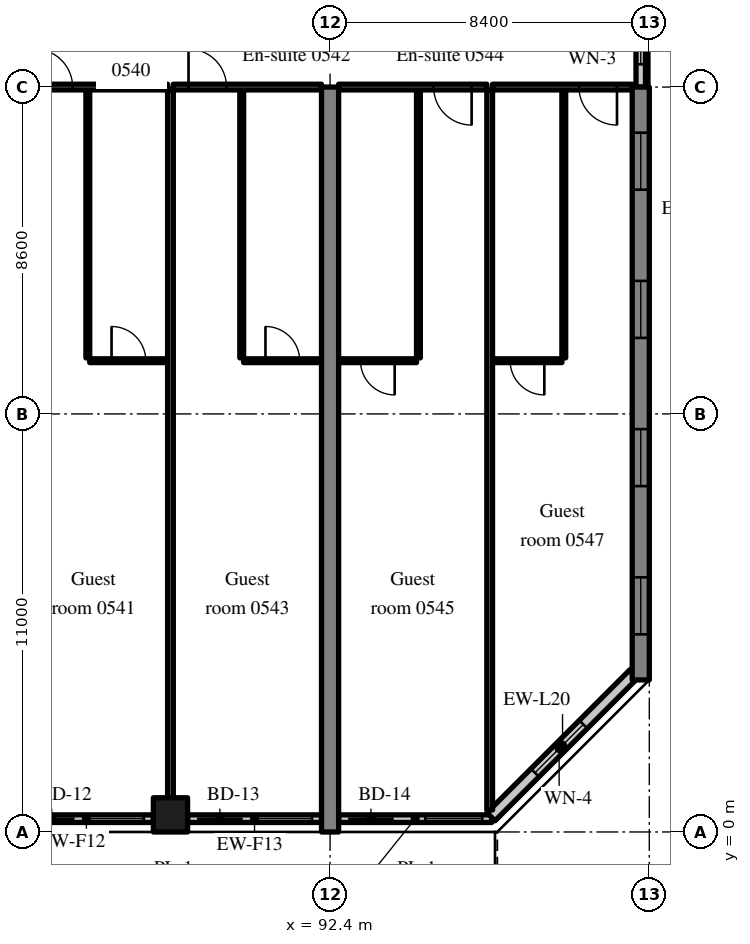
"""IFC4 building model, lengths in metres.
Left out: names, types, materials, properties, quantities, classifications, styles, units other than length and angle.
Written with IfcOpenShell. Run it as: python <this file> out.ifc"""

import sys

from ifc_helpers import new_model, si_unit, direction, frame, frame_2d, origin, origin_2d, place, context, subcontext, project, spatial, rectangle, extrude, source, transform, mapped, element, fill, save


model = new_model("IFC4")
c1 = context("Model", 3, precision=1e-05, world=origin(), true_north=direction((0.0, 1.0)))
c2 = subcontext(c1, "Body", "Model", "MODEL_VIEW")
j1 = project(units=[si_unit("LENGTHUNIT", "METRE"), si_unit("PLANEANGLEUNIT", "RADIAN")], contexts=[c1])
p1 = place(None, origin())
s1 = spatial("IfcSite", under=j1, at=p1, CompositionType="ELEMENT")
p2 = place(p1, origin())
s2 = spatial("IfcBuilding", under=s1, at=p2, CompositionType="ELEMENT")
p3 = place(p2, frame((0.0, 0.0, 27.8)))
s3 = spatial("IfcBuildingStorey", under=s2, at=p3, CompositionType="ELEMENT", Elevation=27.8)
m1 = source(origin(), c2, "Body", "SweptSolid", [
    extrude(rectangle(XDim=19.6, YDim=0.45, at=frame_2d((9.8, 0.0))), origin(), (0.0, 0.0, 1.0), 3.52),
])
p4 = place(p3, frame((92.4, 0.0, 0.0), z_axis=(0.0, 0.0, 1.0), x_axis=(0.0, 1.0, 0.0)))
e1 = element("IfcWall", 1, at=p4, inside=s3, PredefinedType="SHEAR", context=c2, shape_type="MappedRepresentation", body=[
    mapped(m1, transform((0.0, 0.0, 0.0), scale=1.0)),
])
m2 = source(origin(), c2, "Body", "SweptSolid", [
    extrude(rectangle(XDim=15.6, YDim=0.45, at=frame_2d((7.8, 0.0))), origin(), (0.0, 0.0, 1.0), 3.52),
])
p5 = place(p3, frame((100.575, 4.0, 0.0), z_axis=(0.0, 0.0, 1.0), x_axis=(0.0, 1.0, 0.0)))
e2 = element("IfcWall", 2, at=p5, inside=s3, PredefinedType="SHEAR", context=c2, shape_type="MappedRepresentation", body=[
    mapped(m2, transform((0.0, 0.0, 0.0), scale=1.0)),
])
m3 = source(origin(), c2, "Body", "SweptSolid", [
    extrude(rectangle(XDim=1.5, YDim=1.5, at=frame_2d((0.75, 0.75))), frame((0.0, 0.235, 0.0), z_axis=(0.0, -1.0, 0.0), x_axis=(1.0, 0.0, 0.0)), (0.0, 0.0, 1.0), 0.47),
])
p6 = place(p5, frame((1.2, 0.0, 0.9)))
e3 = element("IfcOpeningElement", 3, at=p6, cuts=e2, PredefinedType="OPENING", context=c2, shape_type="MappedRepresentation", body=[
    mapped(m3, transform((0.0, 0.0, 0.0), scale=1.0)),
])
p7 = place(p5, frame((5.1, 0.0, 0.9)))
e4 = element("IfcOpeningElement", 4, at=p7, cuts=e2, PredefinedType="OPENING", context=c2, shape_type="MappedRepresentation", body=[
    mapped(m3, transform((0.0, 0.0, 0.0), scale=1.0)),
])
p8 = place(p5, frame((9.0, 0.0, 0.9)))
e5 = element("IfcOpeningElement", 5, at=p8, cuts=e2, PredefinedType="OPENING", context=c2, shape_type="MappedRepresentation", body=[
    mapped(m3, transform((0.0, 0.0, 0.0), scale=1.0)),
])
p9 = place(p5, frame((12.9, 0.0, 0.9)))
e6 = element("IfcOpeningElement", 6, at=p9, cuts=e2, PredefinedType="OPENING", context=c2, shape_type="MappedRepresentation", body=[
    mapped(m3, transform((0.0, 0.0, 0.0), scale=1.0)),
])
m4 = source(origin(), c2, "Body", "SweptSolid", [
    extrude(rectangle(XDim=0.9, YDim=0.9, at=origin_2d()), origin(), (0.0, 0.0, 1.0), 3.52),
])
p10 = place(p3, frame((88.2, 0.45, 0.0), z_axis=(0.0, 0.0, 1.0), x_axis=(1.0, 0.0, 0.0)))
e7 = element("IfcColumn", 7, at=p10, inside=s3, PredefinedType="COLUMN", context=c2, shape_type="MappedRepresentation", body=[
    mapped(m4, transform((0.0, 0.0, 0.0), scale=1.0)),
])
m5 = source(origin(), c2, "Body", "SweptSolid", [
    extrude(rectangle(XDim=3.525, YDim=0.2, at=frame_2d((1.762, 0.0))), origin(), (0.0, 0.0, 1.0), 2.77),
])
p11 = place(p3, frame((84.225, 0.35, 0.0), z_axis=(0.0, 0.0, 1.0), x_axis=(1.0, 0.0, 0.0)))
e8 = element("IfcWall", 8, at=p11, inside=s3, PredefinedType="SOLIDWALL", context=c2, shape_type="MappedRepresentation", body=[
    mapped(m5, transform((0.0, 0.0, 0.0), scale=1.0)),
])
m6 = source(origin(), c2, "Body", "SweptSolid", [
    extrude(rectangle(XDim=1.2, YDim=2.4, at=frame_2d((0.6, 1.2))), frame((0.0, 0.11, 0.0), z_axis=(0.0, -1.0, 0.0), x_axis=(1.0, 0.0, 0.0)), (0.0, 0.0, 1.0), 0.22),
])
p12 = place(p11, frame((0.25, 0.0, 0.0)))
e9 = element("IfcOpeningElement", 9, at=p12, cuts=e8, PredefinedType="OPENING", context=c2, shape_type="MappedRepresentation", body=[
    mapped(m6, transform((0.0, 0.0, 0.0), scale=1.0)),
])
m7 = source(origin(), c2, "Body", "SweptSolid", [
    extrude(rectangle(XDim=1.5, YDim=1.5, at=frame_2d((0.75, 0.75))), frame((0.0, 0.11, 0.0), z_axis=(0.0, -1.0, 0.0), x_axis=(1.0, 0.0, 0.0)), (0.0, 0.0, 1.0), 0.22),
])
p13 = place(p11, frame((1.775, 0.0, 0.9)))
e10 = element("IfcOpeningElement", 10, at=p13, cuts=e8, PredefinedType="OPENING", context=c2, shape_type="MappedRepresentation", body=[
    mapped(m7, transform((0.0, 0.0, 0.0), scale=1.0)),
])
m8 = source(origin(), c2, "Body", "SweptSolid", [
    extrude(rectangle(XDim=3.525, YDim=0.2, at=frame_2d((1.763, 0.0))), origin(), (0.0, 0.0, 1.0), 2.77),
])
p14 = place(p3, frame((88.65, 0.35, 0.0), z_axis=(0.0, 0.0, 1.0), x_axis=(1.0, 0.0, 0.0)))
e11 = element("IfcWall", 11, at=p14, inside=s3, PredefinedType="SOLIDWALL", context=c2, shape_type="MappedRepresentation", body=[
    mapped(m8, transform((0.0, 0.0, 0.0), scale=1.0)),
])
p15 = place(p14, frame((0.25, 0.0, 0.0)))
e12 = element("IfcOpeningElement", 12, at=p15, cuts=e11, PredefinedType="OPENING", context=c2, shape_type="MappedRepresentation", body=[
    mapped(m6, transform((0.0, 0.0, 0.0), scale=1.0)),
])
p16 = place(p14, frame((1.775, 0.0, 0.9)))
e13 = element("IfcOpeningElement", 13, at=p16, cuts=e11, PredefinedType="OPENING", context=c2, shape_type="MappedRepresentation", body=[
    mapped(m7, transform((0.0, 0.0, 0.0), scale=1.0)),
])
m9 = source(origin(), c2, "Body", "SweptSolid", [
    extrude(rectangle(XDim=4.03, YDim=0.2, at=frame_2d((2.015, 0.0))), origin(), (0.0, 0.0, 1.0), 2.77),
])
p17 = place(p3, frame((92.625, 0.35, 0.0), z_axis=(0.0, 0.0, 1.0), x_axis=(1.0, 0.0, 0.0)))
e14 = element("IfcWall", 14, at=p17, inside=s3, PredefinedType="SOLIDWALL", context=c2, shape_type="MappedRepresentation", body=[
    mapped(m9, transform((0.0, 0.0, 0.0), scale=1.0)),
])
p18 = place(p17, frame((0.25, 0.0, 0.0)))
e15 = element("IfcOpeningElement", 15, at=p18, cuts=e14, PredefinedType="OPENING", context=c2, shape_type="MappedRepresentation", body=[
    mapped(m6, transform((0.0, 0.0, 0.0), scale=1.0)),
])
p19 = place(p17, frame((2.28, 0.0, 0.9)))
e16 = element("IfcOpeningElement", 16, at=p19, cuts=e14, PredefinedType="OPENING", context=c2, shape_type="MappedRepresentation", body=[
    mapped(m7, transform((0.0, 0.0, 0.0), scale=1.0)),
])
m10 = source(origin(), c2, "Body", "SweptSolid", [
    extrude(rectangle(XDim=5.326, YDim=0.3, at=frame_2d((2.663, 0.0))), origin(), (0.0, 0.0, 1.0), 3.52),
])
p20 = place(p3, frame((96.634, 0.4, 0.0), z_axis=(0.0, 0.0, 1.0), x_axis=(0.707083859269, 0.707129702361, 0.0)))
e17 = element("IfcWall", 17, at=p20, inside=s3, PredefinedType="SOLIDWALL", context=c2, shape_type="MappedRepresentation", body=[
    mapped(m10, transform((0.0, 0.0, 0.0), scale=1.0)),
])
m11 = source(origin(), c2, "Body", "SweptSolid", [
    extrude(rectangle(XDim=1.8, YDim=1.5, at=frame_2d((0.9, 0.75))), frame((0.0, 0.16, 0.0), z_axis=(0.0, -1.0, 0.0), x_axis=(1.0, 0.0, 0.0)), (0.0, 0.0, 1.0), 0.32),
])
p21 = place(p20, frame((1.636, 0.0, 0.9)))
e18 = element("IfcOpeningElement", 18, at=p21, cuts=e17, PredefinedType="OPENING", context=c2, shape_type="MappedRepresentation", body=[
    mapped(m11, transform((0.0, 0.0, 0.0), scale=1.0)),
])
m12 = source(origin(), c2, "Body", "SweptSolid", [
    extrude(rectangle(XDim=2.4, YDim=0.25, at=frame_2d((1.2, 0.0))), origin(), (0.0, 0.0, 1.0), 2.62),
])
p22 = place(p3, frame((100.575, 19.6, 0.0), z_axis=(0.0, 0.0, 1.0), x_axis=(0.0, 1.0, 0.0)))
e19 = element("IfcWall", 19, at=p22, inside=s3, PredefinedType="SOLIDWALL", context=c2, shape_type="MappedRepresentation", body=[
    mapped(m12, transform((0.0, 0.0, 0.0), scale=1.0)),
])
m13 = source(origin(), c2, "Body", "SweptSolid", [
    extrude(rectangle(XDim=1.2, YDim=1.5, at=frame_2d((0.6, 0.75))), frame((0.0, 0.135, 0.0), z_axis=(0.0, -1.0, 0.0), x_axis=(1.0, 0.0, 0.0)), (0.0, 0.0, 1.0), 0.27),
])
p23 = place(p22, frame((0.6, 0.0, 0.9)))
e20 = element("IfcOpeningElement", 20, at=p23, cuts=e19, PredefinedType="OPENING", context=c2, shape_type="MappedRepresentation", body=[
    mapped(m13, transform((0.0, 0.0, 0.0), scale=1.0)),
])
m14 = source(origin(), c2, "Body", "SweptSolid", [
    extrude(rectangle(XDim=7.05, YDim=0.1, at=frame_2d((3.525, 0.0))), origin(), (0.0, 0.0, 1.0), 3.52),
])
p24 = place(p3, frame((86.025, 12.475, 0.0), z_axis=(0.0, 0.0, 1.0), x_axis=(0.0, 1.0, 0.0)))
e21 = element("IfcWall", 21, at=p24, inside=s3, PredefinedType="PARTITIONING", context=c2, shape_type="MappedRepresentation", body=[
    mapped(m14, transform((0.0, 0.0, 0.0), scale=1.0)),
])
m15 = source(origin(), c2, "Body", "SweptSolid", [
    extrude(rectangle(XDim=2.05, YDim=0.1, at=frame_2d((1.025, 0.0))), origin(), (0.0, 0.0, 1.0), 3.52),
])
p25 = place(p3, frame((86.075, 12.4, 0.0), z_axis=(0.0, 0.0, 1.0), x_axis=(1.0, 0.0, 0.0)))
e22 = element("IfcWall", 22, at=p25, inside=s3, PredefinedType="PARTITIONING", context=c2, shape_type="MappedRepresentation", body=[
    mapped(m15, transform((0.0, 0.0, 0.0), scale=1.0)),
])
m16 = source(origin(), c2, "Body", "SweptSolid", [
    extrude(rectangle(XDim=0.9, YDim=2.1, at=frame_2d((0.45, 1.05))), frame((0.0, 0.06, 0.0), z_axis=(0.0, -1.0, 0.0), x_axis=(1.0, 0.0, 0.0)), (0.0, 0.0, 1.0), 0.12),
])
p26 = place(p25, frame((0.575, 0.0, 0.0)))
e23 = element("IfcOpeningElement", 23, at=p26, cuts=e22, PredefinedType="OPENING", context=c2, shape_type="MappedRepresentation", body=[
    mapped(m16, transform((0.0, 0.0, 0.0), scale=1.0)),
])
m17 = source(origin(), c2, "Body", "SweptSolid", [
    extrude(rectangle(XDim=3.9, YDim=0.15, at=frame_2d((1.95, 0.0))), origin(), (0.0, 0.0, 1.0), 2.82),
])
p27 = place(p3, frame((84.225, 19.6, 0.0), z_axis=(0.0, 0.0, 1.0), x_axis=(1.0, 0.0, 0.0)))
e24 = element("IfcWall", 24, at=p27, inside=s3, PredefinedType="PARTITIONING", context=c2, shape_type="MappedRepresentation", body=[
    mapped(m17, transform((0.0, 0.0, 0.0), scale=1.0)),
])
m18 = source(origin(), c2, "Body", "SweptSolid", [
    extrude(rectangle(XDim=1.0, YDim=2.1, at=frame_2d((0.5, 1.05))), frame((0.0, 0.085, 0.0), z_axis=(0.0, -1.0, 0.0), x_axis=(1.0, 0.0, 0.0)), (0.0, 0.0, 1.0), 0.17),
])
p28 = place(p27, frame((0.4, 0.0, 0.0)))
e25 = element("IfcOpeningElement", 25, at=p28, cuts=e24, PredefinedType="OPENING", context=c2, shape_type="MappedRepresentation", body=[
    mapped(m18, transform((0.0, 0.0, 0.0), scale=1.0)),
])
p29 = place(p3, frame((90.075, 12.475, 0.0), z_axis=(0.0, 0.0, 1.0), x_axis=(0.0, 1.0, 0.0)))
e26 = element("IfcWall", 26, at=p29, inside=s3, PredefinedType="PARTITIONING", context=c2, shape_type="MappedRepresentation", body=[
    mapped(m14, transform((0.0, 0.0, 0.0), scale=1.0)),
])
p30 = place(p3, frame((90.125, 12.4, 0.0), z_axis=(0.0, 0.0, 1.0), x_axis=(1.0, 0.0, 0.0)))
e27 = element("IfcWall", 27, at=p30, inside=s3, PredefinedType="PARTITIONING", context=c2, shape_type="MappedRepresentation", body=[
    mapped(m15, transform((0.0, 0.0, 0.0), scale=1.0)),
])
p31 = place(p30, frame((0.575, 0.0, 0.0)))
e28 = element("IfcOpeningElement", 28, at=p31, cuts=e27, PredefinedType="OPENING", context=c2, shape_type="MappedRepresentation", body=[
    mapped(m16, transform((0.0, 0.0, 0.0), scale=1.0)),
])
m19 = source(origin(), c2, "Body", "SweptSolid", [
    extrude(rectangle(XDim=3.9, YDim=0.15, at=frame_2d((1.95, 0.0))), origin(), (0.0, 0.0, 1.0), 2.82),
])
p32 = place(p3, frame((88.275, 19.6, 0.0), z_axis=(0.0, 0.0, 1.0), x_axis=(1.0, 0.0, 0.0)))
e29 = element("IfcWall", 29, at=p32, inside=s3, PredefinedType="PARTITIONING", context=c2, shape_type="MappedRepresentation", body=[
    mapped(m19, transform((0.0, 0.0, 0.0), scale=1.0)),
])
p33 = place(p32, frame((0.4, 0.0, 0.0)))
e30 = element("IfcOpeningElement", 30, at=p33, cuts=e29, PredefinedType="OPENING", context=c2, shape_type="MappedRepresentation", body=[
    mapped(m18, transform((0.0, 0.0, 0.0), scale=1.0)),
])
m20 = source(origin(), c2, "Body", "SweptSolid", [
    extrude(rectangle(XDim=18.625, YDim=0.15, at=frame_2d((9.312, 0.0))), origin(), (0.0, 0.0, 1.0), 3.52),
])
p34 = place(p3, frame((88.2, 0.9, 0.0), z_axis=(0.0, 0.0, 1.0), x_axis=(0.0, 1.0, 0.0)))
e31 = element("IfcWall", 31, at=p34, inside=s3, PredefinedType="PARTITIONING", context=c2, shape_type="MappedRepresentation", body=[
    mapped(m20, transform((0.0, 0.0, 0.0), scale=1.0)),
])
p35 = place(p3, frame((94.725, 12.475, 0.0), z_axis=(0.0, 0.0, 1.0), x_axis=(0.0, 1.0, 0.0)))
e32 = element("IfcWall", 32, at=p35, inside=s3, PredefinedType="PARTITIONING", context=c2, shape_type="MappedRepresentation", body=[
    mapped(m14, transform((0.0, 0.0, 0.0), scale=1.0)),
])
p36 = place(p3, frame((92.625, 12.4, 0.0), z_axis=(0.0, 0.0, 1.0), x_axis=(1.0, 0.0, 0.0)))
e33 = element("IfcWall", 33, at=p36, inside=s3, PredefinedType="PARTITIONING", context=c2, shape_type="MappedRepresentation", body=[
    mapped(m15, transform((0.0, 0.0, 0.0), scale=1.0)),
])
p37 = place(p36, frame((0.575, 0.0, 0.0)))
e34 = element("IfcOpeningElement", 34, at=p37, cuts=e33, PredefinedType="OPENING", context=c2, shape_type="MappedRepresentation", body=[
    mapped(m16, transform((0.0, 0.0, 0.0), scale=1.0)),
])
p38 = place(p3, frame((92.625, 19.6, 0.0), z_axis=(0.0, 0.0, 1.0), x_axis=(1.0, 0.0, 0.0)))
e35 = element("IfcWall", 35, at=p38, inside=s3, PredefinedType="PARTITIONING", context=c2, shape_type="MappedRepresentation", body=[
    mapped(m17, transform((0.0, 0.0, 0.0), scale=1.0)),
])
p39 = place(p38, frame((2.5, 0.0, 0.0)))
e36 = element("IfcOpeningElement", 36, at=p39, cuts=e35, PredefinedType="OPENING", context=c2, shape_type="MappedRepresentation", body=[
    mapped(m18, transform((0.0, 0.0, 0.0), scale=1.0)),
])
p40 = place(p3, frame((98.55, 12.475, 0.0), z_axis=(0.0, 0.0, 1.0), x_axis=(0.0, 1.0, 0.0)))
e37 = element("IfcWall", 37, at=p40, inside=s3, PredefinedType="PARTITIONING", context=c2, shape_type="MappedRepresentation", body=[
    mapped(m14, transform((0.0, 0.0, 0.0), scale=1.0)),
])
m21 = source(origin(), c2, "Body", "SweptSolid", [
    extrude(rectangle(XDim=1.825, YDim=0.1, at=frame_2d((0.913, 0.0))), origin(), (0.0, 0.0, 1.0), 3.52),
])
p41 = place(p3, frame((96.675, 12.4, 0.0), z_axis=(0.0, 0.0, 1.0), x_axis=(1.0, 0.0, 0.0)))
e38 = element("IfcWall", 38, at=p41, inside=s3, PredefinedType="PARTITIONING", context=c2, shape_type="MappedRepresentation", body=[
    mapped(m21, transform((0.0, 0.0, 0.0), scale=1.0)),
])
p42 = place(p41, frame((0.463, 0.0, 0.0)))
e39 = element("IfcOpeningElement", 39, at=p42, cuts=e38, PredefinedType="OPENING", context=c2, shape_type="MappedRepresentation", body=[
    mapped(m16, transform((0.0, 0.0, 0.0), scale=1.0)),
])
m22 = source(origin(), c2, "Body", "SweptSolid", [
    extrude(rectangle(XDim=3.675, YDim=0.15, at=frame_2d((1.837, 0.0))), origin(), (0.0, 0.0, 1.0), 2.82),
])
p43 = place(p3, frame((96.675, 19.6, 0.0), z_axis=(0.0, 0.0, 1.0), x_axis=(1.0, 0.0, 0.0)))
e40 = element("IfcWall", 40, at=p43, inside=s3, PredefinedType="PARTITIONING", context=c2, shape_type="MappedRepresentation", body=[
    mapped(m22, transform((0.0, 0.0, 0.0), scale=1.0)),
])
p44 = place(p43, frame((2.275, 0.0, 0.0)))
e41 = element("IfcOpeningElement", 41, at=p44, cuts=e40, PredefinedType="OPENING", context=c2, shape_type="MappedRepresentation", body=[
    mapped(m18, transform((0.0, 0.0, 0.0), scale=1.0)),
])
m23 = source(origin(), c2, "Body", "SweptSolid", [
    extrude(rectangle(XDim=18.947, YDim=0.15, at=frame_2d((9.474, 0.0))), origin(), (0.0, 0.0, 1.0), 3.52),
])
p45 = place(p3, frame((96.6, 0.578, 0.0), z_axis=(0.0, 0.0, 1.0), x_axis=(0.0, 1.0, 0.0)))
e42 = element("IfcWall", 42, at=p45, inside=s3, PredefinedType="PARTITIONING", context=c2, shape_type="MappedRepresentation", body=[
    mapped(m23, transform((0.0, 0.0, 0.0), scale=1.0)),
])
m24 = source(origin(), c2, "Body", "SweptSolid", [
    extrude(rectangle(XDim=1.2, YDim=2.4, at=frame_2d((0.6, 1.2))), frame((0.0, 0.025, 0.0), z_axis=(0.0, -1.0, 0.0), x_axis=(1.0, 0.0, 0.0)), (0.0, 0.0, 1.0), 0.05),
])
p46 = place(p12, origin())
e43 = element("IfcDoor", 43, at=p46, inside=s3, OperationType="SLIDING_TO_RIGHT", PredefinedType="DOOR", context=c2, shape_type="MappedRepresentation", body=[
    mapped(m24, transform((0.0, 0.0, 0.0), scale=1.0)),
])
fill(e9, e43)
m25 = source(origin(), c2, "Body", "SweptSolid", [
    extrude(rectangle(XDim=1.5, YDim=1.5, at=frame_2d((0.75, 0.75))), frame((0.0, 0.03, 0.0), z_axis=(0.0, -1.0, 0.0), x_axis=(1.0, 0.0, 0.0)), (0.0, 0.0, 1.0), 0.06),
])
p47 = place(p13, origin())
e44 = element("IfcWindow", 44, at=p47, inside=s3, PartitioningType="SINGLE_PANEL", PredefinedType="WINDOW", context=c2, shape_type="MappedRepresentation", body=[
    mapped(m25, transform((0.0, 0.0, 0.0), scale=1.0)),
])
fill(e10, e44)
p48 = place(p15, origin())
e45 = element("IfcDoor", 45, at=p48, inside=s3, OperationType="SLIDING_TO_LEFT", PredefinedType="DOOR", context=c2, shape_type="MappedRepresentation", body=[
    mapped(m24, transform((0.0, 0.0, 0.0), scale=1.0)),
])
fill(e12, e45)
p49 = place(p16, origin())
e46 = element("IfcWindow", 46, at=p49, inside=s3, PartitioningType="SINGLE_PANEL", PredefinedType="WINDOW", context=c2, shape_type="MappedRepresentation", body=[
    mapped(m25, transform((0.0, 0.0, 0.0), scale=1.0)),
])
fill(e13, e46)
p50 = place(p18, origin())
e47 = element("IfcDoor", 47, at=p50, inside=s3, OperationType="SLIDING_TO_RIGHT", PredefinedType="DOOR", context=c2, shape_type="MappedRepresentation", body=[
    mapped(m24, transform((0.0, 0.0, 0.0), scale=1.0)),
])
fill(e15, e47)
p51 = place(p19, origin())
e48 = element("IfcWindow", 48, at=p51, inside=s3, PartitioningType="SINGLE_PANEL", PredefinedType="WINDOW", context=c2, shape_type="MappedRepresentation", body=[
    mapped(m25, transform((0.0, 0.0, 0.0), scale=1.0)),
])
fill(e16, e48)
m26 = source(origin(), c2, "Body", "SweptSolid", [
    extrude(rectangle(XDim=1.8, YDim=1.5, at=frame_2d((0.9, 0.75))), frame((0.0, 0.03, 0.0), z_axis=(0.0, -1.0, 0.0), x_axis=(1.0, 0.0, 0.0)), (0.0, 0.0, 1.0), 0.06),
])
p52 = place(p21, origin())
e49 = element("IfcWindow", 49, at=p52, inside=s3, PartitioningType="SINGLE_PANEL", PredefinedType="WINDOW", context=c2, shape_type="MappedRepresentation", body=[
    mapped(m26, transform((0.0, 0.0, 0.0), scale=1.0)),
])
fill(e18, e49)
p53 = place(p6, origin())
e50 = element("IfcWindow", 50, at=p53, inside=s3, PartitioningType="SINGLE_PANEL", PredefinedType="WINDOW", context=c2, shape_type="MappedRepresentation", body=[
    mapped(m25, transform((0.0, 0.0, 0.0), scale=1.0)),
])
fill(e3, e50)
p54 = place(p7, origin())
e51 = element("IfcWindow", 51, at=p54, inside=s3, PartitioningType="SINGLE_PANEL", PredefinedType="WINDOW", context=c2, shape_type="MappedRepresentation", body=[
    mapped(m25, transform((0.0, 0.0, 0.0), scale=1.0)),
])
fill(e4, e51)
p55 = place(p8, origin())
e52 = element("IfcWindow", 52, at=p55, inside=s3, PartitioningType="SINGLE_PANEL", PredefinedType="WINDOW", context=c2, shape_type="MappedRepresentation", body=[
    mapped(m25, transform((0.0, 0.0, 0.0), scale=1.0)),
])
fill(e5, e52)
p56 = place(p9, origin())
e53 = element("IfcWindow", 53, at=p56, inside=s3, PartitioningType="SINGLE_PANEL", PredefinedType="WINDOW", context=c2, shape_type="MappedRepresentation", body=[
    mapped(m25, transform((0.0, 0.0, 0.0), scale=1.0)),
])
fill(e6, e53)
m27 = source(origin(), c2, "Body", "SweptSolid", [
    extrude(rectangle(XDim=1.2, YDim=1.5, at=frame_2d((0.6, 0.75))), frame((0.0, 0.03, 0.0), z_axis=(0.0, -1.0, 0.0), x_axis=(1.0, 0.0, 0.0)), (0.0, 0.0, 1.0), 0.06),
])
p57 = place(p23, origin())
e54 = element("IfcWindow", 54, at=p57, inside=s3, PartitioningType="SINGLE_PANEL", PredefinedType="WINDOW", context=c2, shape_type="MappedRepresentation", body=[
    mapped(m27, transform((0.0, 0.0, 0.0), scale=1.0)),
])
fill(e20, e54)
m28 = source(origin(), c2, "Body", "SweptSolid", [
    extrude(rectangle(XDim=0.9, YDim=2.1, at=frame_2d((0.45, 1.05))), frame((0.0, 0.025, 0.0), z_axis=(0.0, -1.0, 0.0), x_axis=(1.0, 0.0, 0.0)), (0.0, 0.0, 1.0), 0.05),
])
p58 = place(p26, origin())
e55 = element("IfcDoor", 55, at=p58, inside=s3, OperationType="SINGLE_SWING_LEFT", PredefinedType="DOOR", context=c2, shape_type="MappedRepresentation", body=[
    mapped(m28, transform((0.0, 0.0, 0.0), scale=1.0)),
])
fill(e23, e55)
m29 = source(origin(), c2, "Body", "SweptSolid", [
    extrude(rectangle(XDim=1.0, YDim=2.1, at=frame_2d((0.5, 1.05))), frame((0.0, 0.025, 0.0), z_axis=(0.0, -1.0, 0.0), x_axis=(1.0, 0.0, 0.0)), (0.0, 0.0, 1.0), 0.05),
])
p59 = place(p28, origin())
e56 = element("IfcDoor", 56, at=p59, inside=s3, OperationType="SINGLE_SWING_LEFT", PredefinedType="DOOR", context=c2, shape_type="MappedRepresentation", body=[
    mapped(m29, transform((0.0, 0.0, 0.0), scale=1.0)),
])
fill(e25, e56)
p60 = place(p31, origin())
e57 = element("IfcDoor", 57, at=p60, inside=s3, OperationType="SINGLE_SWING_LEFT", PredefinedType="DOOR", context=c2, shape_type="MappedRepresentation", body=[
    mapped(m28, transform((0.0, 0.0, 0.0), scale=1.0)),
])
fill(e28, e57)
p61 = place(p33, origin())
e58 = element("IfcDoor", 58, at=p61, inside=s3, OperationType="SINGLE_SWING_LEFT", PredefinedType="DOOR", context=c2, shape_type="MappedRepresentation", body=[
    mapped(m29, transform((0.0, 0.0, 0.0), scale=1.0)),
])
fill(e30, e58)
p62 = place(p37, origin())
e59 = element("IfcDoor", 59, at=p62, inside=s3, OperationType="SINGLE_SWING_RIGHT", PredefinedType="DOOR", context=c2, shape_type="MappedRepresentation", body=[
    mapped(m28, transform((0.0, 0.0, 0.0), scale=1.0)),
])
fill(e34, e59)
p63 = place(p39, origin())
e60 = element("IfcDoor", 60, at=p63, inside=s3, OperationType="SINGLE_SWING_RIGHT", PredefinedType="DOOR", context=c2, shape_type="MappedRepresentation", body=[
    mapped(m29, transform((0.0, 0.0, 0.0), scale=1.0)),
])
fill(e36, e60)
p64 = place(p42, origin())
e61 = element("IfcDoor", 61, at=p64, inside=s3, OperationType="SINGLE_SWING_RIGHT", PredefinedType="DOOR", context=c2, shape_type="MappedRepresentation", body=[
    mapped(m28, transform((0.0, 0.0, 0.0), scale=1.0)),
])
fill(e39, e61)
p65 = place(p44, origin())
e62 = element("IfcDoor", 62, at=p65, inside=s3, OperationType="SINGLE_SWING_RIGHT", PredefinedType="DOOR", context=c2, shape_type="MappedRepresentation", body=[
    mapped(m29, transform((0.0, 0.0, 0.0), scale=1.0)),
])
fill(e41, e62)
save(model, sys.argv[1])
